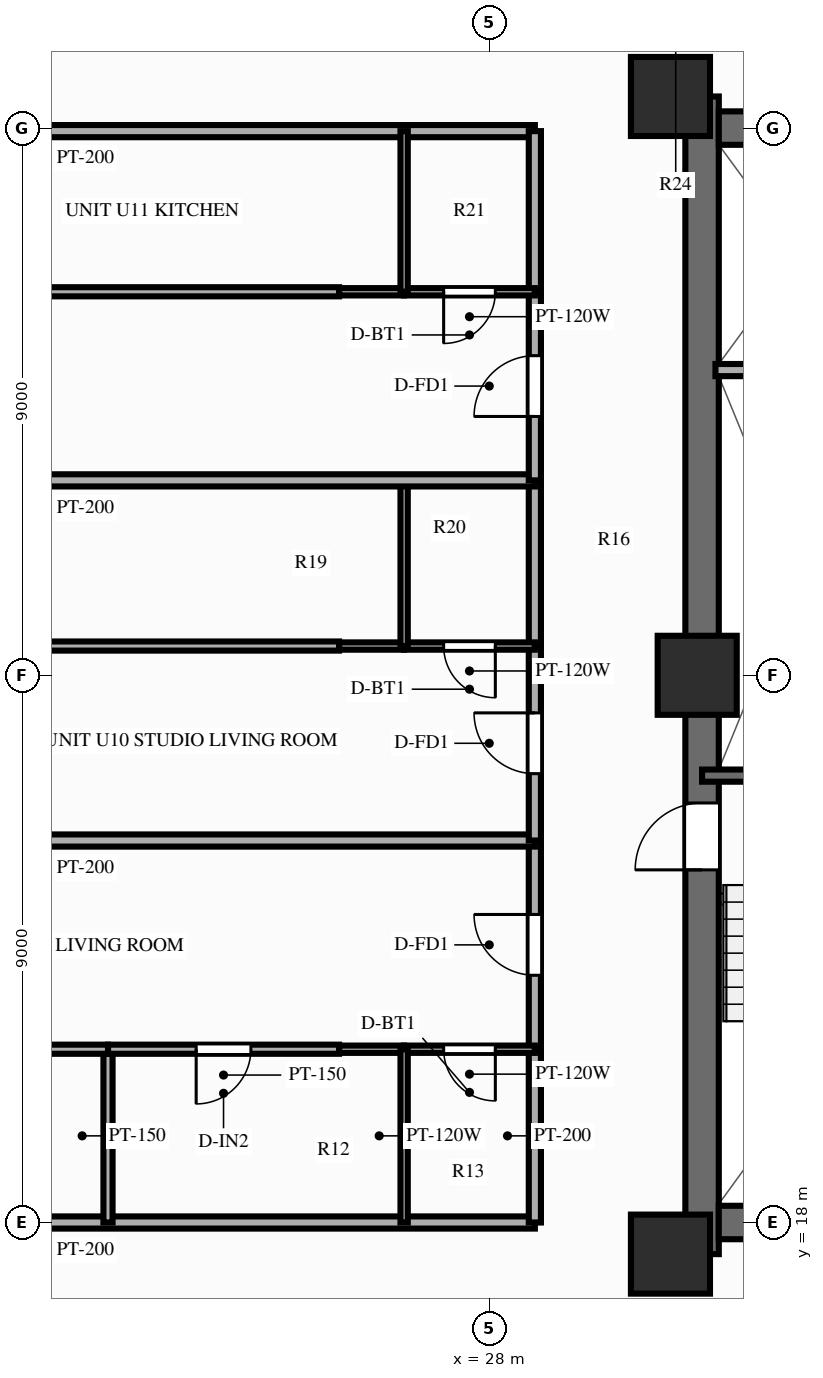
"""IFC4 building model, lengths in metres.
Left out: names, types, materials, properties, quantities, classifications, styles, units other than length and angle.
Written with IfcOpenShell. Run it as: python <this file> out.ifc"""

import sys

from ifc_helpers import new_model, si_unit, direction, frame, frame_2d, origin, origin_2d, place, context, subcontext, project, spatial, rectangle, extrude, source, transform, mapped, element, fill, save


model = new_model("IFC4")
c1 = context("Model", 3, precision=1e-05, world=origin(), true_north=direction((0.0, 1.0)))
c2 = subcontext(c1, "Body", "Model", "MODEL_VIEW")
j1 = project(units=[si_unit("LENGTHUNIT", "METRE"), si_unit("PLANEANGLEUNIT", "RADIAN")], contexts=[c1])
p1 = place(None, origin())
s1 = spatial("IfcSite", under=j1, at=p1, CompositionType="ELEMENT")
p2 = place(p1, origin())
s2 = spatial("IfcBuilding", under=s1, at=p2, CompositionType="ELEMENT")
p3 = place(p2, frame((0.0, 0.0, 89.85)))
s3 = spatial("IfcBuildingStorey", under=s2, at=p3, CompositionType="ELEMENT", Elevation=89.85)
p4 = place(p3, frame((31.5, 17.48, 0.0), z_axis=(0.0, 0.0, 1.0), x_axis=(0.0, 1.0, 0.0)))
e1 = element("IfcWall", 1, at=p4, inside=s3, PredefinedType="SHEAR", context=c2, shape_type="SweptSolid", body=[
    extrude(rectangle(XDim=19.04, YDim=0.55, at=frame_2d((9.52, 0.0))), origin(), (0.0, 0.0, 1.0), 3.0),
])
p5 = place(p4, frame((6.32, 0.0, 0.0)))
e2 = element("IfcOpeningElement", 2, at=p5, cuts=e1, PredefinedType="OPENING", context=c2, shape_type="SweptSolid", body=[
    extrude(rectangle(XDim=1.1, YDim=2.15, at=frame_2d((0.55, 1.075))), frame((0.0, 0.287, 0.0), z_axis=(0.0, -1.0, 0.0), x_axis=(1.0, 0.0, 0.0)), (0.0, 0.0, 1.0), 0.574),
])
p6 = place(p3, frame((31.775, 18.0, 0.0), z_axis=(0.0, 0.0, 1.0), x_axis=(1.0, 0.0, 0.0)))
e3 = element("IfcWall", 3, at=p6, inside=s3, PredefinedType="SHEAR", context=c2, shape_type="SweptSolid", body=[
    extrude(rectangle(XDim=12.45, YDim=0.55, at=frame_2d((6.225, 0.0))), origin(), (0.0, 0.0, 1.0), 3.0),
])
p7 = place(p3, frame((31.775, 36.0, 0.0), z_axis=(0.0, 0.0, 1.0), x_axis=(1.0, 0.0, 0.0)))
e4 = element("IfcWall", 4, at=p7, inside=s3, PredefinedType="SHEAR", context=c2, shape_type="SweptSolid", body=[
    extrude(rectangle(XDim=12.45, YDim=0.55, at=frame_2d((6.225, 0.0))), origin(), (0.0, 0.0, 1.0), 3.0),
])
p8 = place(p7, frame((5.175, 0.0, 0.0), z_axis=(0.0, 0.0, 1.0), x_axis=(-1.0, 0.0, 0.0)))
e5 = element("IfcOpeningElement", 5, at=p8, cuts=e4, PredefinedType="OPENING", context=c2, shape_type="SweptSolid", body=[
    extrude(rectangle(XDim=1.4, YDim=2.15, at=frame_2d((0.7, 1.075))), frame((0.0, 0.287, 0.0), z_axis=(0.0, -1.0, 0.0), x_axis=(1.0, 0.0, 0.0)), (0.0, 0.0, 1.0), 0.574),
])
m1 = source(origin(), c2, "Body", "SweptSolid", [
    extrude(rectangle(XDim=1.3, YDim=1.3, at=origin_2d()), origin(), (0.0, 0.0, 1.0), 3.0),
])
for number, where, z_axis, x_axis in (
    (6, (30.98, 17.48, 0.0), (0.0, 0.0, 1.0), (1.0, 0.0, 0.0)),
    (7, (30.98, 36.52, 0.0), (0.0, 0.0, 1.0), (1.0, 0.0, 0.0)),
    (8, (31.42, 27.0, 0.0), (0.0, 0.0, 1.0), (1.0, 0.0, 0.0)),
):
    element("IfcColumn", number, at=place(p3, frame(where, z_axis=z_axis, x_axis=x_axis)), inside=s3, PredefinedType="COLUMN", context=c2, shape_type="MappedRepresentation", body=[
        mapped(m1, transform((0.0, 0.0, 0.0), scale=1.0)),
    ])
p9 = place(p3, frame((31.5, 25.35, 0.0), z_axis=(0.0, 0.0, 1.0), x_axis=(1.0, 0.0, 0.0)))
e9 = element("IfcWall", 9, at=p9, inside=s3, PredefinedType="SOLIDWALL", context=c2, shape_type="SweptSolid", body=[
    extrude(rectangle(XDim=3.93, YDim=0.2, at=frame_2d((1.965, 0.0))), origin(), (0.0, 0.0, 1.0), 2.79),
])
p10 = place(p3, frame((31.72, 32.02, 0.0), z_axis=(0.0, 0.0, 1.0), x_axis=(1.0, 0.0, 0.0)))
e10 = element("IfcWall", 10, at=p10, inside=s3, PredefinedType="PARTITIONING", context=c2, shape_type="SweptSolid", body=[
    extrude(rectangle(XDim=2.8, YDim=0.2, at=frame_2d((1.4, 0.0))), origin(), (0.0, 0.0, 1.0), 2.79),
])
for number, where, z_axis, x_axis in (
    (11, (28.75, 18.0, 0.0), (0.0, 0.0, 1.0), (-1.0, 0.0, 0.0)),
    (12, (28.75, 35.95, 0.0), (0.0, 0.0, 1.0), (-1.0, 0.0, 0.0)),
):
    element("IfcWall", number, at=place(p3, frame(where, z_axis=z_axis, x_axis=x_axis)), inside=s3, PredefinedType="PARTITIONING", context=c2, shape_type="SweptSolid", body=[
        extrude(rectangle(XDim=16.6, YDim=0.2, at=frame_2d((8.3, 0.0))), origin(), (0.0, 0.0, 1.0), 2.34),
    ])
p11 = place(p3, frame((28.75, 18.0, 0.0), z_axis=(0.0, 0.0, 1.0), x_axis=(0.0, 1.0, 0.0)))
e13 = element("IfcWall", 13, at=p11, inside=s3, PredefinedType="PARTITIONING", context=c2, shape_type="SweptSolid", body=[
    extrude(rectangle(XDim=2.85, YDim=0.2, at=frame_2d((1.425, 0.0))), origin(), (0.0, 0.0, 1.0), 2.79),
])
p12 = place(p3, frame((28.75, 20.85, 0.0), z_axis=(0.0, 0.0, 1.0), x_axis=(0.0, 1.0, 0.0)))
e14 = element("IfcWall", 14, at=p12, inside=s3, PredefinedType="PARTITIONING", context=c2, shape_type="SweptSolid", body=[
    extrude(rectangle(XDim=3.432, YDim=0.2, at=frame_2d((1.716, 0.0))), origin(), (0.0, 0.0, 1.0), 2.79),
])
p13 = place(p12, frame((1.216, 0.0, 0.0)))
e15 = element("IfcOpeningElement", 15, at=p13, cuts=e14, PredefinedType="OPENING", context=c2, shape_type="SweptSolid", body=[
    extrude(rectangle(XDim=1.0, YDim=2.15, at=frame_2d((0.5, 1.075))), frame((0.0, 0.112, 0.0), z_axis=(0.0, -1.0, 0.0), x_axis=(1.0, 0.0, 0.0)), (0.0, 0.0, 1.0), 0.224),
])
p14 = place(p3, frame((28.75, 20.85, 0.0), z_axis=(0.0, 0.0, 1.0), x_axis=(-1.0, 0.0, 0.0)))
e16 = element("IfcWall", 16, at=p14, inside=s3, PredefinedType="PARTITIONING", context=c2, shape_type="SweptSolid", body=[
    extrude(rectangle(XDim=2.15, YDim=0.12, at=frame_2d((1.075, 0.0))), origin(), (0.0, 0.0, 1.0), 2.79),
])
p15 = place(p14, frame((0.65, 0.0, 0.0)))
e17 = element("IfcOpeningElement", 17, at=p15, cuts=e16, PredefinedType="OPENING", context=c2, shape_type="SweptSolid", body=[
    extrude(rectangle(XDim=0.85, YDim=2.05, at=frame_2d((0.425, 1.025))), frame((0.0, 0.072, 0.0), z_axis=(0.0, -1.0, 0.0), x_axis=(1.0, 0.0, 0.0)), (0.0, 0.0, 1.0), 0.144),
])
p16 = place(p3, frame((26.6, 20.85, 0.0), z_axis=(0.0, 0.0, 1.0), x_axis=(-1.0, 0.0, 0.0)))
e18 = element("IfcWall", 18, at=p16, inside=s3, PredefinedType="PARTITIONING", context=c2, shape_type="SweptSolid", body=[
    extrude(rectangle(XDim=1.07, YDim=0.12, at=frame_2d((0.535, 0.0))), origin(), (0.0, 0.0, 1.0), 2.79),
])
p17 = place(p3, frame((26.6, 18.0, 0.0), z_axis=(0.0, 0.0, 1.0), x_axis=(0.0, 1.0, 0.0)))
e19 = element("IfcWall", 19, at=p17, inside=s3, PredefinedType="PARTITIONING", context=c2, shape_type="SweptSolid", body=[
    extrude(rectangle(XDim=2.85, YDim=0.12, at=frame_2d((1.425, 0.0))), origin(), (0.0, 0.0, 1.0), 2.79),
])
p18 = place(p3, frame((21.73, 18.0, 0.0), z_axis=(0.0, 0.0, 1.0), x_axis=(0.0, 1.0, 0.0)))
e20 = element("IfcWall", 20, at=p18, inside=s3, PredefinedType="PARTITIONING", context=c2, shape_type="SweptSolid", body=[
    extrude(rectangle(XDim=2.85, YDim=0.15, at=frame_2d((1.425, 0.0))), origin(), (0.0, 0.0, 1.0), 2.49),
])
p19 = place(p3, frame((25.53, 20.85, 0.0), z_axis=(0.0, 0.0, 1.0), x_axis=(-1.0, 0.0, 0.0)))
e21 = element("IfcWall", 21, at=p19, inside=s3, PredefinedType="PARTITIONING", context=c2, shape_type="SweptSolid", body=[
    extrude(rectangle(XDim=3.8, YDim=0.15, at=frame_2d((1.9, 0.0))), origin(), (0.0, 0.0, 1.0), 2.79),
])
p20 = place(p19, frame((1.45, 0.0, 0.0)))
e22 = element("IfcOpeningElement", 22, at=p20, cuts=e21, PredefinedType="OPENING", context=c2, shape_type="SweptSolid", body=[
    extrude(rectangle(XDim=0.9, YDim=2.1, at=frame_2d((0.45, 1.05))), frame((0.0, 0.087, 0.0), z_axis=(0.0, -1.0, 0.0), x_axis=(1.0, 0.0, 0.0)), (0.0, 0.0, 1.0), 0.174),
])
p21 = place(p3, frame((21.73, 20.85, 0.0), z_axis=(0.0, 0.0, 1.0), x_axis=(-1.0, 0.0, 0.0)))
e23 = element("IfcWall", 23, at=p21, inside=s3, PredefinedType="PARTITIONING", context=c2, shape_type="SweptSolid", body=[
    extrude(rectangle(XDim=9.58, YDim=0.15, at=frame_2d((4.79, 0.0))), origin(), (0.0, 0.0, 1.0), 2.79),
])
p22 = place(p21, frame((4.34, 0.0, 0.0)))
e24 = element("IfcOpeningElement", 24, at=p22, cuts=e23, PredefinedType="OPENING", context=c2, shape_type="SweptSolid", body=[
    extrude(rectangle(XDim=0.9, YDim=2.1, at=frame_2d((0.45, 1.05))), frame((0.0, 0.087, 0.0), z_axis=(0.0, -1.0, 0.0), x_axis=(1.0, 0.0, 0.0)), (0.0, 0.0, 1.0), 0.174),
])
p23 = place(p3, frame((28.75, 24.282, 0.0), z_axis=(0.0, 0.0, 1.0), x_axis=(-1.0, 0.0, 0.0)))
e25 = element("IfcWall", 25, at=p23, inside=s3, PredefinedType="PARTITIONING", context=c2, shape_type="SweptSolid", body=[
    extrude(rectangle(XDim=16.6, YDim=0.2, at=frame_2d((8.3, 0.0))), origin(), (0.0, 0.0, 1.0), 2.79),
])
p24 = place(p3, frame((28.75, 24.282, 0.0), z_axis=(0.0, 0.0, 1.0), x_axis=(0.0, 1.0, 0.0)))
e26 = element("IfcWall", 26, at=p24, inside=s3, PredefinedType="PARTITIONING", context=c2, shape_type="SweptSolid", body=[
    extrude(rectangle(XDim=3.199, YDim=0.2, at=frame_2d((1.599, 0.0))), origin(), (0.0, 0.0, 1.0), 2.79),
])
p25 = place(p24, frame((1.099, 0.0, 0.0)))
e27 = element("IfcOpeningElement", 27, at=p25, cuts=e26, PredefinedType="OPENING", context=c2, shape_type="SweptSolid", body=[
    extrude(rectangle(XDim=1.0, YDim=2.15, at=frame_2d((0.5, 1.075))), frame((0.0, 0.112, 0.0), z_axis=(0.0, -1.0, 0.0), x_axis=(1.0, 0.0, 0.0)), (0.0, 0.0, 1.0), 0.224),
])
p26 = place(p3, frame((28.75, 27.481, 0.0), z_axis=(0.0, 0.0, 1.0), x_axis=(0.0, 1.0, 0.0)))
e28 = element("IfcWall", 28, at=p26, inside=s3, PredefinedType="PARTITIONING", context=c2, shape_type="SweptSolid", body=[
    extrude(rectangle(XDim=2.725, YDim=0.2, at=frame_2d((1.362, 0.0))), origin(), (0.0, 0.0, 1.0), 2.79),
])
p27 = place(p3, frame((28.75, 27.481, 0.0), z_axis=(0.0, 0.0, 1.0), x_axis=(-1.0, 0.0, 0.0)))
e29 = element("IfcWall", 29, at=p27, inside=s3, PredefinedType="PARTITIONING", context=c2, shape_type="SweptSolid", body=[
    extrude(rectangle(XDim=2.15, YDim=0.12, at=frame_2d((1.075, 0.0))), origin(), (0.0, 0.0, 1.0), 2.79),
])
p28 = place(p27, frame((0.65, 0.0, 0.0)))
e30 = element("IfcOpeningElement", 30, at=p28, cuts=e29, PredefinedType="OPENING", context=c2, shape_type="SweptSolid", body=[
    extrude(rectangle(XDim=0.85, YDim=2.05, at=frame_2d((0.425, 1.025))), frame((0.0, 0.072, 0.0), z_axis=(0.0, -1.0, 0.0), x_axis=(1.0, 0.0, 0.0)), (0.0, 0.0, 1.0), 0.144),
])
p29 = place(p3, frame((26.6, 27.481, 0.0), z_axis=(0.0, 0.0, 1.0), x_axis=(-1.0, 0.0, 0.0)))
e31 = element("IfcWall", 31, at=p29, inside=s3, PredefinedType="PARTITIONING", context=c2, shape_type="SweptSolid", body=[
    extrude(rectangle(XDim=1.07, YDim=0.12, at=frame_2d((0.535, 0.0))), origin(), (0.0, 0.0, 1.0), 2.79),
])
p30 = place(p3, frame((26.6, 27.481, 0.0), z_axis=(0.0, 0.0, 1.0), x_axis=(0.0, 1.0, 0.0)))
e32 = element("IfcWall", 32, at=p30, inside=s3, PredefinedType="PARTITIONING", context=c2, shape_type="SweptSolid", body=[
    extrude(rectangle(XDim=2.725, YDim=0.12, at=frame_2d((1.362, 0.0))), origin(), (0.0, 0.0, 1.0), 2.79),
])
p31 = place(p3, frame((25.53, 27.481, 0.0), z_axis=(0.0, 0.0, 1.0), x_axis=(-1.0, 0.0, 0.0)))
e33 = element("IfcWall", 33, at=p31, inside=s3, PredefinedType="PARTITIONING", context=c2, shape_type="SweptSolid", body=[
    extrude(rectangle(XDim=13.38, YDim=0.15, at=frame_2d((6.69, 0.0))), origin(), (0.0, 0.0, 1.0), 2.79),
])
p32 = place(p31, frame((5.74, 0.0, 0.0)))
e34 = element("IfcOpeningElement", 34, at=p32, cuts=e33, PredefinedType="OPENING", context=c2, shape_type="SweptSolid", body=[
    extrude(rectangle(XDim=0.9, YDim=2.1, at=frame_2d((0.45, 1.05))), frame((0.0, 0.087, 0.0), z_axis=(0.0, -1.0, 0.0), x_axis=(1.0, 0.0, 0.0)), (0.0, 0.0, 1.0), 0.174),
])
p33 = place(p3, frame((28.75, 30.206, 0.0), z_axis=(0.0, 0.0, 1.0), x_axis=(-1.0, 0.0, 0.0)))
e35 = element("IfcWall", 35, at=p33, inside=s3, PredefinedType="PARTITIONING", context=c2, shape_type="SweptSolid", body=[
    extrude(rectangle(XDim=16.6, YDim=0.2, at=frame_2d((8.3, 0.0))), origin(), (0.0, 0.0, 1.0), 2.79),
])
p34 = place(p3, frame((28.75, 30.206, 0.0), z_axis=(0.0, 0.0, 1.0), x_axis=(0.0, 1.0, 0.0)))
e36 = element("IfcWall", 36, at=p34, inside=s3, PredefinedType="PARTITIONING", context=c2, shape_type="SweptSolid", body=[
    extrude(rectangle(XDim=3.102, YDim=0.2, at=frame_2d((1.551, 0.0))), origin(), (0.0, 0.0, 1.0), 2.79),
])
p35 = place(p34, frame((1.051, 0.0, 0.0)))
e37 = element("IfcOpeningElement", 37, at=p35, cuts=e36, PredefinedType="OPENING", context=c2, shape_type="SweptSolid", body=[
    extrude(rectangle(XDim=1.0, YDim=2.15, at=frame_2d((0.5, 1.075))), frame((0.0, 0.112, 0.0), z_axis=(0.0, -1.0, 0.0), x_axis=(1.0, 0.0, 0.0)), (0.0, 0.0, 1.0), 0.224),
])
p36 = place(p3, frame((28.75, 33.308, 0.0), z_axis=(0.0, 0.0, 1.0), x_axis=(0.0, 1.0, 0.0)))
e38 = element("IfcWall", 38, at=p36, inside=s3, PredefinedType="PARTITIONING", context=c2, shape_type="SweptSolid", body=[
    extrude(rectangle(XDim=2.642, YDim=0.2, at=frame_2d((1.321, 0.0))), origin(), (0.0, 0.0, 1.0), 2.79),
])
p37 = place(p3, frame((28.75, 33.308, 0.0), z_axis=(0.0, 0.0, 1.0), x_axis=(-1.0, 0.0, 0.0)))
e39 = element("IfcWall", 39, at=p37, inside=s3, PredefinedType="PARTITIONING", context=c2, shape_type="SweptSolid", body=[
    extrude(rectangle(XDim=2.15, YDim=0.12, at=frame_2d((1.075, 0.0))), origin(), (0.0, 0.0, 1.0), 2.79),
])
p38 = place(p37, frame((0.65, 0.0, 0.0)))
e40 = element("IfcOpeningElement", 40, at=p38, cuts=e39, PredefinedType="OPENING", context=c2, shape_type="SweptSolid", body=[
    extrude(rectangle(XDim=0.85, YDim=2.05, at=frame_2d((0.425, 1.025))), frame((0.0, 0.072, 0.0), z_axis=(0.0, -1.0, 0.0), x_axis=(1.0, 0.0, 0.0)), (0.0, 0.0, 1.0), 0.144),
])
p39 = place(p3, frame((26.6, 33.308, 0.0), z_axis=(0.0, 0.0, 1.0), x_axis=(-1.0, 0.0, 0.0)))
e41 = element("IfcWall", 41, at=p39, inside=s3, PredefinedType="PARTITIONING", context=c2, shape_type="SweptSolid", body=[
    extrude(rectangle(XDim=1.07, YDim=0.12, at=frame_2d((0.535, 0.0))), origin(), (0.0, 0.0, 1.0), 2.79),
])
p40 = place(p3, frame((26.6, 33.308, 0.0), z_axis=(0.0, 0.0, 1.0), x_axis=(0.0, 1.0, 0.0)))
e42 = element("IfcWall", 42, at=p40, inside=s3, PredefinedType="PARTITIONING", context=c2, shape_type="SweptSolid", body=[
    extrude(rectangle(XDim=2.642, YDim=0.12, at=frame_2d((1.321, 0.0))), origin(), (0.0, 0.0, 1.0), 2.79),
])
p41 = place(p3, frame((25.53, 33.308, 0.0), z_axis=(0.0, 0.0, 1.0), x_axis=(-1.0, 0.0, 0.0)))
e43 = element("IfcWall", 43, at=p41, inside=s3, PredefinedType="PARTITIONING", context=c2, shape_type="SweptSolid", body=[
    extrude(rectangle(XDim=13.38, YDim=0.15, at=frame_2d((6.69, 0.0))), origin(), (0.0, 0.0, 1.0), 2.79),
])
p42 = place(p41, frame((5.74, 0.0, 0.0)))
e44 = element("IfcOpeningElement", 44, at=p42, cuts=e43, PredefinedType="OPENING", context=c2, shape_type="SweptSolid", body=[
    extrude(rectangle(XDim=0.9, YDim=2.1, at=frame_2d((0.45, 1.05))), frame((0.0, 0.087, 0.0), z_axis=(0.0, -1.0, 0.0), x_axis=(1.0, 0.0, 0.0)), (0.0, 0.0, 1.0), 0.174),
])
m2 = source(origin(), c2, "Body", "SweptSolid", [
    extrude(rectangle(XDim=1.1, YDim=2.15, at=frame_2d((0.55, 1.075))), frame((0.0, 0.025, 0.0), z_axis=(0.0, -1.0, 0.0), x_axis=(1.0, 0.0, 0.0)), (0.0, 0.0, 1.0), 0.05),
])
p43 = place(p5, origin())
e45 = element("IfcDoor", 45, at=p43, inside=s3, OperationType="SINGLE_SWING_LEFT", PredefinedType="DOOR", context=c2, shape_type="MappedRepresentation", body=[
    mapped(m2, transform((0.0, 0.0, 0.0), scale=1.0)),
])
fill(e2, e45)
m3 = source(origin(), c2, "Body", "SweptSolid", [
    extrude(rectangle(XDim=1.0, YDim=2.15, at=frame_2d((0.5, 1.075))), frame((0.0, 0.025, 0.0), z_axis=(0.0, -1.0, 0.0), x_axis=(1.0, 0.0, 0.0)), (0.0, 0.0, 1.0), 0.05),
])
p44 = place(p13, origin())
e46 = element("IfcDoor", 46, at=p44, inside=s3, OperationType="SINGLE_SWING_RIGHT", PredefinedType="DOOR", context=c2, shape_type="MappedRepresentation", body=[
    mapped(m3, transform((0.0, 0.0, 0.0), scale=1.0)),
])
fill(e15, e46)
m4 = source(origin(), c2, "Body", "SweptSolid", [
    extrude(rectangle(XDim=0.85, YDim=2.05, at=frame_2d((0.425, 1.025))), frame((0.0, 0.025, 0.0), z_axis=(0.0, -1.0, 0.0), x_axis=(1.0, 0.0, 0.0)), (0.0, 0.0, 1.0), 0.05),
])
p45 = place(p15, origin())
e47 = element("IfcDoor", 47, at=p45, inside=s3, OperationType="SINGLE_SWING_LEFT", PredefinedType="DOOR", context=c2, shape_type="MappedRepresentation", body=[
    mapped(m4, transform((0.0, 0.0, 0.0), scale=1.0)),
])
fill(e17, e47)
m5 = source(origin(), c2, "Body", "SweptSolid", [
    extrude(rectangle(XDim=0.9, YDim=2.1, at=frame_2d((0.45, 1.05))), frame((0.0, 0.025, 0.0), z_axis=(0.0, -1.0, 0.0), x_axis=(1.0, 0.0, 0.0)), (0.0, 0.0, 1.0), 0.05),
])
p46 = place(p20, origin())
e48 = element("IfcDoor", 48, at=p46, inside=s3, OperationType="SINGLE_SWING_RIGHT", PredefinedType="DOOR", context=c2, shape_type="MappedRepresentation", body=[
    mapped(m5, transform((0.0, 0.0, 0.0), scale=1.0)),
])
fill(e22, e48)
p47 = place(p25, origin())
e49 = element("IfcDoor", 49, at=p47, inside=s3, OperationType="SINGLE_SWING_RIGHT", PredefinedType="DOOR", context=c2, shape_type="MappedRepresentation", body=[
    mapped(m3, transform((0.0, 0.0, 0.0), scale=1.0)),
])
fill(e27, e49)
p48 = place(p28, origin())
e50 = element("IfcDoor", 50, at=p48, inside=s3, OperationType="SINGLE_SWING_LEFT", PredefinedType="DOOR", context=c2, shape_type="MappedRepresentation", body=[
    mapped(m4, transform((0.0, 0.0, 0.0), scale=1.0)),
])
fill(e30, e50)
p49 = place(p35, origin())
e51 = element("IfcDoor", 51, at=p49, inside=s3, OperationType="SINGLE_SWING_LEFT", PredefinedType="DOOR", context=c2, shape_type="MappedRepresentation", body=[
    mapped(m3, transform((0.0, 0.0, 0.0), scale=1.0)),
])
fill(e37, e51)
p50 = place(p38, origin())
e52 = element("IfcDoor", 52, at=p50, inside=s3, OperationType="SINGLE_SWING_RIGHT", PredefinedType="DOOR", context=c2, shape_type="MappedRepresentation", body=[
    mapped(m4, transform((0.0, 0.0, 0.0), scale=1.0)),
])
fill(e40, e52)
save(model, sys.argv[1])
